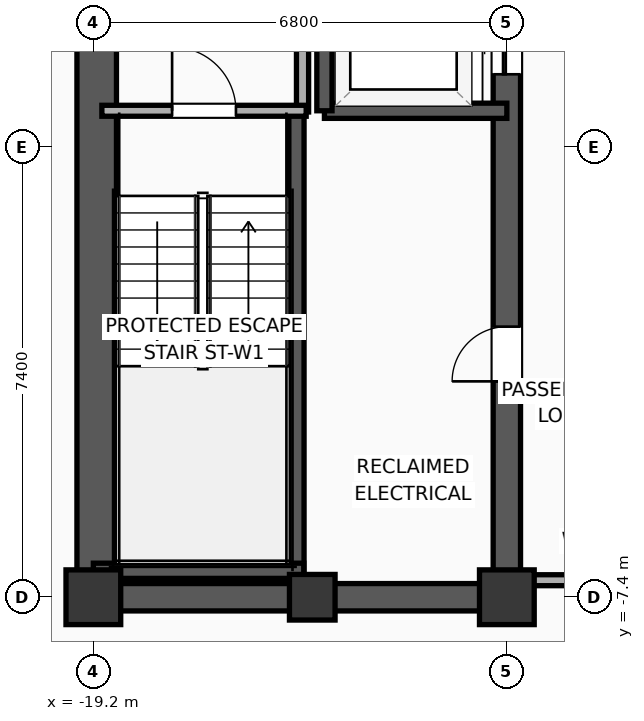
"""IFC4 building model, lengths in metres.
Left out: names, types, materials, properties, quantities, classifications, styles, units other than length and angle.
Written with IfcOpenShell. Run it as: python <this file> out.ifc"""

import sys

from ifc_helpers import new_model, si_unit, direction, frame, frame_2d, origin, origin_2d, place, context, subcontext, project, spatial, rectangle, extrude, element, fill, save


model = new_model("IFC4")
c1 = context("Model", 3, precision=1e-05, world=origin(), true_north=direction((0.0, 1.0)))
c2 = subcontext(c1, "Body", "Model", "MODEL_VIEW")
j1 = project(units=[si_unit("LENGTHUNIT", "METRE"), si_unit("PLANEANGLEUNIT", "RADIAN")], contexts=[c1])
p1 = place(None, origin())
s1 = spatial("IfcSite", under=j1, at=p1, CompositionType="ELEMENT")
p2 = place(p1, origin())
s2 = spatial("IfcBuilding", under=s1, at=p2, CompositionType="ELEMENT")
p3 = place(p2, frame((0.0, 0.0, 227.5)))
s3 = spatial("IfcBuildingStorey", under=s2, at=p3, CompositionType="ELEMENT", Elevation=227.5)
p4 = place(p3, frame((-19.2, -7.4, 0.0), z_axis=(0.0, 0.0, 1.0), x_axis=(1.0, 0.0, 0.0)))
e1 = element("IfcColumn", 1, at=p4, inside=s3, PredefinedType="COLUMN", context=c2, shape_type="SweptSolid", body=[
    extrude(rectangle(XDim=0.9, YDim=0.9, at=origin_2d()), origin(), (0.0, 0.0, 1.0), 3.9),
])
p5 = place(p3, frame((-15.6, -7.4, 0.0), z_axis=(0.0, 0.0, 1.0), x_axis=(1.0, 0.0, 0.0)))
e2 = element("IfcColumn", 2, at=p5, inside=s3, PredefinedType="COLUMN", context=c2, shape_type="SweptSolid", body=[
    extrude(rectangle(XDim=0.75, YDim=0.75, at=origin_2d()), origin(), (0.0, 0.0, 1.0), 3.9),
])
p6 = place(p3, frame((-12.4, -7.4, 0.0), z_axis=(0.0, 0.0, 1.0), x_axis=(1.0, 0.0, 0.0)))
e3 = element("IfcColumn", 3, at=p6, inside=s3, PredefinedType="COLUMN", context=c2, shape_type="SweptSolid", body=[
    extrude(rectangle(XDim=0.9, YDim=0.9, at=origin_2d()), origin(), (0.0, 0.0, 1.0), 3.9),
])
p7 = place(p3, frame((-19.425, -7.4, 0.0), z_axis=(0.0, 0.0, 1.0), x_axis=(1.0, 0.0, 0.0)))
e4 = element("IfcWall", 4, at=p7, inside=s3, PredefinedType="SHEAR", context=c2, shape_type="SweptSolid", body=[
    extrude(rectangle(XDim=7.25, YDim=0.45, at=frame_2d((3.625, 0.0))), origin(), (0.0, 0.0, 1.0), 3.65),
])
p8 = place(p3, frame((-19.145, -7.4, 0.0), z_axis=(0.0, 0.0, 1.0), x_axis=(0.0, 1.0, 0.0)))
e5 = element("IfcWall", 5, at=p8, inside=s3, PredefinedType="SHEAR", context=c2, shape_type="SweptSolid", body=[
    extrude(rectangle(XDim=14.8, YDim=0.65, at=frame_2d((7.4, 0.0))), origin(), (0.0, 0.0, 1.0), 3.65),
])
p9 = place(p3, frame((-12.4, -7.4, 0.0), z_axis=(0.0, 0.0, 1.0), x_axis=(0.0, 1.0, 0.0)))
e6 = element("IfcWall", 6, at=p9, inside=s3, PredefinedType="SHEAR", context=c2, shape_type="SweptSolid", body=[
    extrude(rectangle(XDim=14.8, YDim=0.45, at=frame_2d((7.4, 0.0))), origin(), (0.0, 0.0, 1.0), 3.65),
])
p10 = place(p9, frame((8.6, 0.0, 0.0)))
e7 = element("IfcOpeningElement", 7, at=p10, cuts=e6, PredefinedType="OPENING", context=c2, shape_type="SweptSolid", body=[
    extrude(rectangle(XDim=1.1, YDim=2.05, at=frame_2d((0.55, 1.025))), frame((0.0, 0.235, 0.0), z_axis=(0.0, -1.0, 0.0), x_axis=(1.0, 0.0, 0.0)), (0.0, 0.0, 1.0), 0.47),
])
p11 = place(p9, frame((10.53, 0.0, 0.0)))
e8 = element("IfcOpeningElement", 8, at=p11, cuts=e6, PredefinedType="OPENING", context=c2, shape_type="SweptSolid", body=[
    extrude(rectangle(XDim=1.1, YDim=2.05, at=frame_2d((0.55, 1.025))), frame((0.0, 0.235, 0.0), z_axis=(0.0, -1.0, 0.0), x_axis=(1.0, 0.0, 0.0)), (0.0, 0.0, 1.0), 0.47),
])
p12 = place(p9, frame((3.55, 0.0, 0.0)))
e9 = element("IfcOpeningElement", 9, at=p12, cuts=e6, PredefinedType="OPENING", context=c2, shape_type="SweptSolid", body=[
    extrude(rectangle(XDim=0.9, YDim=2.05, at=frame_2d((0.45, 1.025))), frame((0.0, 0.235, 0.0), z_axis=(0.0, -1.0, 0.0), x_axis=(1.0, 0.0, 0.0)), (0.0, 0.0, 1.0), 0.47),
])
p13 = place(p3, frame((-15.86, -7.085, 0.0), z_axis=(0.0, 0.0, 1.0), x_axis=(0.0, 1.0, 0.0)))
e10 = element("IfcWall", 10, at=p13, inside=s3, PredefinedType="SOLIDWALL", context=c2, shape_type="SweptSolid", body=[
    extrude(rectangle(XDim=7.685, YDim=0.25, at=frame_2d((3.843, 0.0))), origin(), (0.0, 0.0, 1.0), 3.65),
])
p14 = place(p3, frame((-19.2, -6.965, 0.0), z_axis=(0.0, 0.0, 1.0), x_axis=(1.0, 0.0, 0.0)))
e11 = element("IfcWall", 11, at=p14, inside=s3, PredefinedType="SOLIDWALL", context=c2, shape_type="SweptSolid", body=[
    extrude(rectangle(XDim=3.46, YDim=0.25, at=frame_2d((1.73, 0.0))), origin(), (0.0, 0.0, 1.0), 3.65),
])
p15 = place(p3, frame((-15.4, 0.6, 0.0), z_axis=(0.0, 0.0, 1.0), x_axis=(1.0, 0.0, 0.0)))
e12 = element("IfcWall", 12, at=p15, inside=s3, PredefinedType="SOLIDWALL", context=c2, shape_type="SweptSolid", body=[
    extrude(rectangle(XDim=3.0, YDim=0.25, at=frame_2d((1.5, 0.0))), origin(), (0.0, 0.0, 1.0), 3.65),
])
p16 = place(p3, frame((-15.4, 2.9, 0.0), z_axis=(0.0, 0.0, 1.0), x_axis=(0.0, -1.0, 0.0)))
e13 = element("IfcWall", 13, at=p16, inside=s3, PredefinedType="SOLIDWALL", context=c2, shape_type="SweptSolid", body=[
    extrude(rectangle(XDim=2.3, YDim=0.25, at=frame_2d((1.15, 0.0))), origin(), (0.0, 0.0, 1.0), 3.65),
])
p17 = place(p3, frame((-15.76, 0.58, 0.0), z_axis=(0.0, 0.0, 1.0), x_axis=(0.0, 1.0, 0.0)))
e14 = element("IfcWall", 14, at=p17, inside=s3, PredefinedType="PARTITIONING", context=c2, shape_type="SweptSolid", body=[
    extrude(rectangle(XDim=2.52, YDim=0.2, at=frame_2d((1.26, 0.0))), origin(), (0.0, 0.0, 1.0), 3.65),
])
p18 = place(p3, frame((-19.06, 0.6, 0.0), z_axis=(0.0, 0.0, 1.0), x_axis=(1.0, 0.0, 0.0)))
e15 = element("IfcWall", 15, at=p18, inside=s3, PredefinedType="PARTITIONING", context=c2, shape_type="SweptSolid", body=[
    extrude(rectangle(XDim=3.36, YDim=0.18, at=frame_2d((1.68, 0.0))), origin(), (0.0, 0.0, 1.0), 3.65),
])
p19 = place(p18, frame((1.155, 0.0, 0.0)))
e16 = element("IfcOpeningElement", 16, at=p19, cuts=e15, PredefinedType="OPENING", context=c2, shape_type="SweptSolid", body=[
    extrude(rectangle(XDim=1.05, YDim=2.05, at=frame_2d((0.525, 1.025))), frame((0.0, 0.1, 0.0), z_axis=(0.0, -1.0, 0.0), x_axis=(1.0, 0.0, 0.0)), (0.0, 0.0, 1.0), 0.2),
])
p20 = place(p3, frame((-12.15, -7.12, 0.0), z_axis=(0.0, 0.0, 1.0), x_axis=(1.0, 0.0, 0.0)))
e17 = element("IfcWall", 17, at=p20, inside=s3, PredefinedType="PARTITIONING", context=c2, shape_type="SweptSolid", body=[
    extrude(rectangle(XDim=2.27, YDim=0.18, at=frame_2d((1.135, 0.0))), origin(), (0.0, 0.0, 1.0), 3.65),
])
p21 = place(p10, origin())
e18 = element("IfcDoor", 18, at=p21, inside=s3, OperationType="SLIDING_TO_LEFT", PredefinedType="DOOR", context=c2, shape_type="SweptSolid", body=[
    extrude(rectangle(XDim=1.1, YDim=2.05, at=frame_2d((0.55, 1.025))), frame((0.0, 0.025, 0.0), z_axis=(0.0, -1.0, 0.0), x_axis=(1.0, 0.0, 0.0)), (0.0, 0.0, 1.0), 0.05),
])
fill(e7, e18)
p22 = place(p19, origin())
e19 = element("IfcDoor", 19, at=p22, inside=s3, OperationType="SINGLE_SWING_LEFT", PredefinedType="DOOR", context=c2, shape_type="SweptSolid", body=[
    extrude(rectangle(XDim=1.05, YDim=2.05, at=frame_2d((0.525, 1.025))), frame((0.0, 0.025, 0.0), z_axis=(0.0, -1.0, 0.0), x_axis=(1.0, 0.0, 0.0)), (0.0, 0.0, 1.0), 0.05),
])
fill(e16, e19)
p23 = place(p12, origin())
e20 = element("IfcDoor", 20, at=p23, inside=s3, OperationType="SINGLE_SWING_LEFT", PredefinedType="DOOR", context=c2, shape_type="SweptSolid", body=[
    extrude(rectangle(XDim=0.9, YDim=2.05, at=frame_2d((0.45, 1.025))), frame((0.0, 0.025, 0.0), z_axis=(0.0, -1.0, 0.0), x_axis=(1.0, 0.0, 0.0)), (0.0, 0.0, 1.0), 0.05),
])
fill(e9, e20)
save(model, sys.argv[1])
